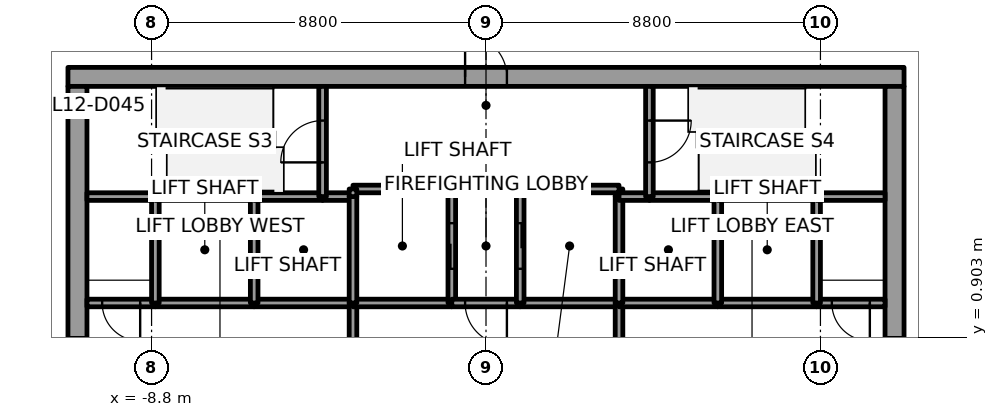
"""IFC4 building model, lengths in metres.
Left out: names, types, materials, properties, quantities, classifications, styles, units other than length and angle.
Written with IfcOpenShell. Run it as: python <this file> out.ifc"""

import sys

from ifc_helpers import new_model, si_unit, direction, frame, frame_2d, origin, place, context, subcontext, project, spatial, rectangle, extrude, element, fill, save


model = new_model("IFC4")
c1 = context("Model", 3, precision=1e-05, world=origin(), true_north=direction((0.0, 1.0)))
c2 = subcontext(c1, "Body", "Model", "MODEL_VIEW")
j1 = project(units=[si_unit("LENGTHUNIT", "METRE"), si_unit("PLANEANGLEUNIT", "RADIAN")], contexts=[c1])
p1 = place(None, origin())
s1 = spatial("IfcSite", under=j1, at=p1, CompositionType="ELEMENT")
p2 = place(p1, origin())
s2 = spatial("IfcBuilding", under=s1, at=p2, CompositionType="ELEMENT")
p3 = place(p2, frame((0.0, 0.0, 66.5)))
s3 = spatial("IfcBuildingStorey", under=s2, at=p3, CompositionType="ELEMENT", Elevation=66.5)
p4 = place(p3, frame((-11.0, 7.75, 0.0), z_axis=(0.0, 0.0, 1.0), x_axis=(1.0, 0.0, 0.0)))
e1 = element("IfcWall", 1, at=p4, inside=s3, PredefinedType="SHEAR", context=c2, shape_type="SweptSolid", body=[
    extrude(rectangle(XDim=22.0, YDim=0.5, at=frame_2d((11.0, 0.0))), origin(), (0.0, 0.0, 1.0), 3.7),
])
p5 = place(p4, frame((10.45, 0.0, 0.0)))
e2 = element("IfcOpeningElement", 2, at=p5, cuts=e1, PredefinedType="OPENING", context=c2, shape_type="SweptSolid", body=[
    extrude(rectangle(XDim=1.1, YDim=2.1, at=frame_2d((0.55, 1.05))), frame((0.0, 0.25, 0.0), z_axis=(0.0, -1.0, 0.0), x_axis=(1.0, 0.0, 0.0)), (0.0, 0.0, 1.0), 0.5),
])
p6 = place(p3, frame((-10.75, -7.5, 0.0), z_axis=(0.0, 0.0, 1.0), x_axis=(0.0, 1.0, 0.0)))
e3 = element("IfcWall", 3, at=p6, inside=s3, PredefinedType="SHEAR", context=c2, shape_type="SweptSolid", body=[
    extrude(rectangle(XDim=15.0, YDim=0.5, at=frame_2d((7.5, 0.0))), origin(), (0.0, 0.0, 1.0), 3.7),
])
p7 = place(p6, frame((6.6, 0.0, 0.0)))
e4 = element("IfcOpeningElement", 4, at=p7, cuts=e3, PredefinedType="OPENING", context=c2, shape_type="SweptSolid", body=[
    extrude(rectangle(XDim=1.8, YDim=2.1, at=frame_2d((0.9, 1.05))), frame((0.0, 0.25, 0.0), z_axis=(0.0, -1.0, 0.0), x_axis=(1.0, 0.0, 0.0)), (0.0, 0.0, 1.0), 0.5),
])
p8 = place(p3, frame((10.75, -7.5, 0.0), z_axis=(0.0, 0.0, 1.0), x_axis=(0.0, 1.0, 0.0)))
e5 = element("IfcWall", 5, at=p8, inside=s3, PredefinedType="SHEAR", context=c2, shape_type="SweptSolid", body=[
    extrude(rectangle(XDim=15.0, YDim=0.5, at=frame_2d((7.5, 0.0))), origin(), (0.0, 0.0, 1.0), 3.7),
])
p9 = place(p8, frame((6.6, 0.0, 0.0)))
e6 = element("IfcOpeningElement", 6, at=p9, cuts=e5, PredefinedType="OPENING", context=c2, shape_type="SweptSolid", body=[
    extrude(rectangle(XDim=1.8, YDim=2.1, at=frame_2d((0.9, 1.05))), frame((0.0, 0.25, 0.0), z_axis=(0.0, -1.0, 0.0), x_axis=(1.0, 0.0, 0.0)), (0.0, 0.0, 1.0), 0.5),
])
p10 = place(p3, frame((-8.7, 1.8, 0.0), z_axis=(0.0, 0.0, 1.0), x_axis=(-1.0, 0.0, 0.0)))
e7 = element("IfcWall", 7, at=p10, inside=s3, PredefinedType="SOLIDWALL", context=c2, shape_type="SweptSolid", body=[
    extrude(rectangle(XDim=1.8, YDim=0.2, at=frame_2d((0.9, 0.0))), origin(), (0.0, 0.0, 1.0), 3.55),
])
p11 = place(p10, frame((0.4, 0.0, 0.0)))
e8 = element("IfcOpeningElement", 8, at=p11, cuts=e7, PredefinedType="OPENING", context=c2, shape_type="SweptSolid", body=[
    extrude(rectangle(XDim=1.0, YDim=2.1, at=frame_2d((0.5, 1.05))), frame((0.0, 0.1, 0.0), z_axis=(0.0, -1.0, 0.0), x_axis=(1.0, 0.0, 0.0)), (0.0, 0.0, 1.0), 0.2),
])
p12 = place(p3, frame((-8.7, 4.6, 0.0), z_axis=(0.0, 0.0, 1.0), x_axis=(-1.0, 0.0, 0.0)))
e9 = element("IfcWall", 9, at=p12, inside=s3, PredefinedType="SOLIDWALL", context=c2, shape_type="SweptSolid", body=[
    extrude(rectangle(XDim=1.8, YDim=0.2, at=frame_2d((0.9, 0.0))), origin(), (0.0, 0.0, 1.0), 3.55),
])
p13 = place(p3, frame((-6.1, 1.8, 0.0), z_axis=(0.0, 0.0, 1.0), x_axis=(-1.0, 0.0, 0.0)))
e10 = element("IfcWall", 10, at=p13, inside=s3, PredefinedType="SOLIDWALL", context=c2, shape_type="SweptSolid", body=[
    extrude(rectangle(XDim=2.6, YDim=0.2, at=frame_2d((1.3, 0.0))), origin(), (0.0, 0.0, 1.0), 3.55),
])
p14 = place(p3, frame((-8.7, 1.8, 0.0), z_axis=(0.0, 0.0, 1.0), x_axis=(0.0, 1.0, 0.0)))
e11 = element("IfcWall", 11, at=p14, inside=s3, PredefinedType="SOLIDWALL", context=c2, shape_type="SweptSolid", body=[
    extrude(rectangle(XDim=2.8, YDim=0.2, at=frame_2d((1.4, 0.0))), origin(), (0.0, 0.0, 1.0), 3.55),
])
p15 = place(p3, frame((-6.1, 4.6, 0.0), z_axis=(0.0, 0.0, 1.0), x_axis=(-1.0, 0.0, 0.0)))
e12 = element("IfcWall", 12, at=p15, inside=s3, PredefinedType="SOLIDWALL", context=c2, shape_type="SweptSolid", body=[
    extrude(rectangle(XDim=2.6, YDim=0.2, at=frame_2d((1.3, 0.0))), origin(), (0.0, 0.0, 1.0), 3.55),
])
p16 = place(p3, frame((-3.5, 1.8, 0.0), z_axis=(0.0, 0.0, 1.0), x_axis=(-1.0, 0.0, 0.0)))
e13 = element("IfcWall", 13, at=p16, inside=s3, PredefinedType="SOLIDWALL", context=c2, shape_type="SweptSolid", body=[
    extrude(rectangle(XDim=2.6, YDim=0.2, at=frame_2d((1.3, 0.0))), origin(), (0.0, 0.0, 1.0), 3.55),
])
p17 = place(p3, frame((-6.1, 1.8, 0.0), z_axis=(0.0, 0.0, 1.0), x_axis=(0.0, 1.0, 0.0)))
e14 = element("IfcWall", 14, at=p17, inside=s3, PredefinedType="SOLIDWALL", context=c2, shape_type="SweptSolid", body=[
    extrude(rectangle(XDim=2.8, YDim=0.2, at=frame_2d((1.4, 0.0))), origin(), (0.0, 0.0, 1.0), 3.55),
])
p18 = place(p3, frame((-4.3, 4.6, 0.0), z_axis=(0.0, 0.0, 1.0), x_axis=(-1.0, 0.0, 0.0)))
e15 = element("IfcWall", 15, at=p18, inside=s3, PredefinedType="SOLIDWALL", context=c2, shape_type="SweptSolid", body=[
    extrude(rectangle(XDim=1.8, YDim=0.2, at=frame_2d((0.9, 0.0))), origin(), (0.0, 0.0, 1.0), 3.55),
])
p19 = place(p3, frame((-3.5, 4.6, 0.0), z_axis=(0.0, 0.0, 1.0), x_axis=(-1.0, 0.0, 0.0)))
e16 = element("IfcWall", 16, at=p19, inside=s3, PredefinedType="SOLIDWALL", context=c2, shape_type="SweptSolid", body=[
    extrude(rectangle(XDim=0.8, YDim=0.2, at=frame_2d((0.4, 0.0))), origin(), (0.0, 0.0, 1.0), 3.55),
])
p20 = place(p3, frame((-4.3, 4.6, 0.0), z_axis=(0.0, 0.0, 1.0), x_axis=(0.0, 1.0, 0.0)))
e17 = element("IfcWall", 17, at=p20, inside=s3, PredefinedType="SOLIDWALL", context=c2, shape_type="SweptSolid", body=[
    extrude(rectangle(XDim=2.9, YDim=0.2, at=frame_2d((1.45, 0.0))), origin(), (0.0, 0.0, 1.0), 3.55),
])
p21 = place(p20, frame((0.9, 0.0, 0.0)))
e18 = element("IfcOpeningElement", 18, at=p21, cuts=e17, PredefinedType="OPENING", context=c2, shape_type="SweptSolid", body=[
    extrude(rectangle(XDim=1.1, YDim=2.1, at=frame_2d((0.55, 1.05))), frame((0.0, 0.1, 0.0), z_axis=(0.0, -1.0, 0.0), x_axis=(1.0, 0.0, 0.0)), (0.0, 0.0, 1.0), 0.2),
])
p22 = place(p3, frame((-3.5, 1.8, 0.0), z_axis=(0.0, 0.0, 1.0), x_axis=(0.0, -1.0, 0.0)))
e19 = element("IfcWall", 19, at=p22, inside=s3, PredefinedType="SOLIDWALL", context=c2, shape_type="SweptSolid", body=[
    extrude(rectangle(XDim=3.6, YDim=0.2, at=frame_2d((1.8, 0.0))), origin(), (0.0, 0.0, 1.0), 3.55),
])
p23 = place(p22, frame((1.05, 0.0, 0.0)))
e20 = element("IfcOpeningElement", 20, at=p23, cuts=e19, PredefinedType="OPENING", context=c2, shape_type="SweptSolid", body=[
    extrude(rectangle(XDim=1.5, YDim=2.1, at=frame_2d((0.75, 1.05))), frame((0.0, 0.1, 0.0), z_axis=(0.0, -1.0, 0.0), x_axis=(1.0, 0.0, 0.0)), (0.0, 0.0, 1.0), 0.2),
])
p24 = place(p3, frame((-0.9, 1.8, 0.0), z_axis=(0.0, 0.0, 1.0), x_axis=(-1.0, 0.0, 0.0)))
e21 = element("IfcWall", 21, at=p24, inside=s3, PredefinedType="SOLIDWALL", context=c2, shape_type="SweptSolid", body=[
    extrude(rectangle(XDim=2.6, YDim=0.2, at=frame_2d((1.3, 0.0))), origin(), (0.0, 0.0, 1.0), 3.55),
])
p25 = place(p3, frame((-3.5, 4.6, 0.0), z_axis=(0.0, 0.0, 1.0), x_axis=(0.0, -1.0, 0.0)))
e22 = element("IfcWall", 22, at=p25, inside=s3, PredefinedType="SOLIDWALL", context=c2, shape_type="SweptSolid", body=[
    extrude(rectangle(XDim=2.8, YDim=0.2, at=frame_2d((1.4, 0.0))), origin(), (0.0, 0.0, 1.0), 3.55),
])
p26 = place(p3, frame((-0.9, 1.8, 0.0), z_axis=(0.0, 0.0, 1.0), x_axis=(0.0, 1.0, 0.0)))
e23 = element("IfcWall", 23, at=p26, inside=s3, PredefinedType="SOLIDWALL", context=c2, shape_type="SweptSolid", body=[
    extrude(rectangle(XDim=3.0, YDim=0.2, at=frame_2d((1.5, 0.0))), origin(), (0.0, 0.0, 1.0), 3.55),
])
p27 = place(p26, frame((0.9, 0.0, 0.0)))
e24 = element("IfcOpeningElement", 24, at=p27, cuts=e23, PredefinedType="OPENING", context=c2, shape_type="SweptSolid", body=[
    extrude(rectangle(XDim=1.2, YDim=2.1, at=frame_2d((0.6, 1.05))), frame((0.0, 0.1, 0.0), z_axis=(0.0, -1.0, 0.0), x_axis=(1.0, 0.0, 0.0)), (0.0, 0.0, 1.0), 0.2),
])
p28 = place(p3, frame((-0.9, 4.8, 0.0), z_axis=(0.0, 0.0, 1.0), x_axis=(-1.0, 0.0, 0.0)))
e25 = element("IfcWall", 25, at=p28, inside=s3, PredefinedType="SOLIDWALL", context=c2, shape_type="SweptSolid", body=[
    extrude(rectangle(XDim=2.6, YDim=0.2, at=frame_2d((1.3, 0.0))), origin(), (0.0, 0.0, 1.0), 3.55),
])
p29 = place(p3, frame((-3.5, 4.8, 0.0), z_axis=(0.0, 0.0, 1.0), x_axis=(0.0, -1.0, 0.0)))
e26 = element("IfcWall", 26, at=p29, inside=s3, PredefinedType="SOLIDWALL", context=c2, shape_type="SweptSolid", body=[
    extrude(rectangle(XDim=0.2, YDim=0.2, at=frame_2d((0.1, 0.0))), origin(), (0.0, 0.0, 1.0), 3.55),
])
p30 = place(p3, frame((0.9, 1.8, 0.0), z_axis=(0.0, 0.0, 1.0), x_axis=(-1.0, 0.0, 0.0)))
e27 = element("IfcWall", 27, at=p30, inside=s3, PredefinedType="SOLIDWALL", context=c2, shape_type="SweptSolid", body=[
    extrude(rectangle(XDim=1.8, YDim=0.2, at=frame_2d((0.9, 0.0))), origin(), (0.0, 0.0, 1.0), 3.55),
])
p31 = place(p30, frame((0.35, 0.0, 0.0)))
e28 = element("IfcOpeningElement", 28, at=p31, cuts=e27, PredefinedType="OPENING", context=c2, shape_type="SweptSolid", body=[
    extrude(rectangle(XDim=1.1, YDim=2.1, at=frame_2d((0.55, 1.05))), frame((0.0, 0.1, 0.0), z_axis=(0.0, -1.0, 0.0), x_axis=(1.0, 0.0, 0.0)), (0.0, 0.0, 1.0), 0.2),
])
p32 = place(p3, frame((3.5, 1.8, 0.0), z_axis=(0.0, 0.0, 1.0), x_axis=(-1.0, 0.0, 0.0)))
e29 = element("IfcWall", 29, at=p32, inside=s3, PredefinedType="SOLIDWALL", context=c2, shape_type="SweptSolid", body=[
    extrude(rectangle(XDim=2.6, YDim=0.2, at=frame_2d((1.3, 0.0))), origin(), (0.0, 0.0, 1.0), 3.55),
])
p33 = place(p3, frame((3.5, 4.6, 0.0), z_axis=(0.0, 0.0, 1.0), x_axis=(0.0, 1.0, 0.0)))
e30 = element("IfcWall", 30, at=p33, inside=s3, PredefinedType="SOLIDWALL", context=c2, shape_type="SweptSolid", body=[
    extrude(rectangle(XDim=0.2, YDim=0.2, at=frame_2d((0.1, 0.0))), origin(), (0.0, 0.0, 1.0), 3.55),
])
p34 = place(p3, frame((3.5, 4.8, 0.0), z_axis=(0.0, 0.0, 1.0), x_axis=(-1.0, 0.0, 0.0)))
e31 = element("IfcWall", 31, at=p34, inside=s3, PredefinedType="SOLIDWALL", context=c2, shape_type="SweptSolid", body=[
    extrude(rectangle(XDim=2.6, YDim=0.2, at=frame_2d((1.3, 0.0))), origin(), (0.0, 0.0, 1.0), 3.55),
])
p35 = place(p3, frame((0.9, 4.8, 0.0), z_axis=(0.0, 0.0, 1.0), x_axis=(0.0, -1.0, 0.0)))
e32 = element("IfcWall", 32, at=p35, inside=s3, PredefinedType="SOLIDWALL", context=c2, shape_type="SweptSolid", body=[
    extrude(rectangle(XDim=3.0, YDim=0.2, at=frame_2d((1.5, 0.0))), origin(), (0.0, 0.0, 1.0), 3.55),
])
p36 = place(p35, frame((0.9, 0.0, 0.0)))
e33 = element("IfcOpeningElement", 33, at=p36, cuts=e32, PredefinedType="OPENING", context=c2, shape_type="SweptSolid", body=[
    extrude(rectangle(XDim=1.2, YDim=2.1, at=frame_2d((0.6, 1.05))), frame((0.0, 0.1, 0.0), z_axis=(0.0, -1.0, 0.0), x_axis=(1.0, 0.0, 0.0)), (0.0, 0.0, 1.0), 0.2),
])
p37 = place(p3, frame((3.5, -1.8, 0.0), z_axis=(0.0, 0.0, 1.0), x_axis=(0.0, 1.0, 0.0)))
e34 = element("IfcWall", 34, at=p37, inside=s3, PredefinedType="SOLIDWALL", context=c2, shape_type="SweptSolid", body=[
    extrude(rectangle(XDim=3.6, YDim=0.2, at=frame_2d((1.8, 0.0))), origin(), (0.0, 0.0, 1.0), 3.55),
])
p38 = place(p37, frame((1.05, 0.0, 0.0)))
e35 = element("IfcOpeningElement", 35, at=p38, cuts=e34, PredefinedType="OPENING", context=c2, shape_type="SweptSolid", body=[
    extrude(rectangle(XDim=1.5, YDim=2.1, at=frame_2d((0.75, 1.05))), frame((0.0, 0.1, 0.0), z_axis=(0.0, -1.0, 0.0), x_axis=(1.0, 0.0, 0.0)), (0.0, 0.0, 1.0), 0.2),
])
p39 = place(p3, frame((6.1, 1.8, 0.0), z_axis=(0.0, 0.0, 1.0), x_axis=(-1.0, 0.0, 0.0)))
e36 = element("IfcWall", 36, at=p39, inside=s3, PredefinedType="SOLIDWALL", context=c2, shape_type="SweptSolid", body=[
    extrude(rectangle(XDim=2.6, YDim=0.2, at=frame_2d((1.3, 0.0))), origin(), (0.0, 0.0, 1.0), 3.55),
])
p40 = place(p3, frame((3.5, 1.8, 0.0), z_axis=(0.0, 0.0, 1.0), x_axis=(0.0, 1.0, 0.0)))
e37 = element("IfcWall", 37, at=p40, inside=s3, PredefinedType="SOLIDWALL", context=c2, shape_type="SweptSolid", body=[
    extrude(rectangle(XDim=2.8, YDim=0.2, at=frame_2d((1.4, 0.0))), origin(), (0.0, 0.0, 1.0), 3.55),
])
p41 = place(p3, frame((4.3, 4.6, 0.0), z_axis=(0.0, 0.0, 1.0), x_axis=(-1.0, 0.0, 0.0)))
e38 = element("IfcWall", 38, at=p41, inside=s3, PredefinedType="SOLIDWALL", context=c2, shape_type="SweptSolid", body=[
    extrude(rectangle(XDim=0.8, YDim=0.2, at=frame_2d((0.4, 0.0))), origin(), (0.0, 0.0, 1.0), 3.55),
])
p42 = place(p3, frame((6.1, 4.6, 0.0), z_axis=(0.0, 0.0, 1.0), x_axis=(-1.0, 0.0, 0.0)))
e39 = element("IfcWall", 39, at=p42, inside=s3, PredefinedType="SOLIDWALL", context=c2, shape_type="SweptSolid", body=[
    extrude(rectangle(XDim=1.8, YDim=0.2, at=frame_2d((0.9, 0.0))), origin(), (0.0, 0.0, 1.0), 3.55),
])
p43 = place(p3, frame((4.3, 7.5, 0.0), z_axis=(0.0, 0.0, 1.0), x_axis=(0.0, -1.0, 0.0)))
e40 = element("IfcWall", 40, at=p43, inside=s3, PredefinedType="SOLIDWALL", context=c2, shape_type="SweptSolid", body=[
    extrude(rectangle(XDim=2.9, YDim=0.2, at=frame_2d((1.45, 0.0))), origin(), (0.0, 0.0, 1.0), 3.55),
])
p44 = place(p43, frame((0.9, 0.0, 0.0)))
e41 = element("IfcOpeningElement", 41, at=p44, cuts=e40, PredefinedType="OPENING", context=c2, shape_type="SweptSolid", body=[
    extrude(rectangle(XDim=1.1, YDim=2.1, at=frame_2d((0.55, 1.05))), frame((0.0, 0.1, 0.0), z_axis=(0.0, -1.0, 0.0), x_axis=(1.0, 0.0, 0.0)), (0.0, 0.0, 1.0), 0.2),
])
p45 = place(p3, frame((8.7, 1.8, 0.0), z_axis=(0.0, 0.0, 1.0), x_axis=(-1.0, 0.0, 0.0)))
e42 = element("IfcWall", 42, at=p45, inside=s3, PredefinedType="SOLIDWALL", context=c2, shape_type="SweptSolid", body=[
    extrude(rectangle(XDim=2.6, YDim=0.2, at=frame_2d((1.3, 0.0))), origin(), (0.0, 0.0, 1.0), 3.55),
])
p46 = place(p3, frame((6.1, 1.8, 0.0), z_axis=(0.0, 0.0, 1.0), x_axis=(0.0, 1.0, 0.0)))
e43 = element("IfcWall", 43, at=p46, inside=s3, PredefinedType="SOLIDWALL", context=c2, shape_type="SweptSolid", body=[
    extrude(rectangle(XDim=2.8, YDim=0.2, at=frame_2d((1.4, 0.0))), origin(), (0.0, 0.0, 1.0), 3.55),
])
p47 = place(p3, frame((8.7, 4.6, 0.0), z_axis=(0.0, 0.0, 1.0), x_axis=(-1.0, 0.0, 0.0)))
e44 = element("IfcWall", 44, at=p47, inside=s3, PredefinedType="SOLIDWALL", context=c2, shape_type="SweptSolid", body=[
    extrude(rectangle(XDim=2.6, YDim=0.2, at=frame_2d((1.3, 0.0))), origin(), (0.0, 0.0, 1.0), 3.55),
])
p48 = place(p3, frame((10.5, 1.8, 0.0), z_axis=(0.0, 0.0, 1.0), x_axis=(-1.0, 0.0, 0.0)))
e45 = element("IfcWall", 45, at=p48, inside=s3, PredefinedType="SOLIDWALL", context=c2, shape_type="SweptSolid", body=[
    extrude(rectangle(XDim=1.8, YDim=0.2, at=frame_2d((0.9, 0.0))), origin(), (0.0, 0.0, 1.0), 3.55),
])
p49 = place(p48, frame((0.4, 0.0, 0.0)))
e46 = element("IfcOpeningElement", 46, at=p49, cuts=e45, PredefinedType="OPENING", context=c2, shape_type="SweptSolid", body=[
    extrude(rectangle(XDim=1.0, YDim=2.1, at=frame_2d((0.5, 1.05))), frame((0.0, 0.1, 0.0), z_axis=(0.0, -1.0, 0.0), x_axis=(1.0, 0.0, 0.0)), (0.0, 0.0, 1.0), 0.2),
])
p50 = place(p3, frame((8.7, 4.6, 0.0), z_axis=(0.0, 0.0, 1.0), x_axis=(0.0, -1.0, 0.0)))
e47 = element("IfcWall", 47, at=p50, inside=s3, PredefinedType="SOLIDWALL", context=c2, shape_type="SweptSolid", body=[
    extrude(rectangle(XDim=2.8, YDim=0.2, at=frame_2d((1.4, 0.0))), origin(), (0.0, 0.0, 1.0), 3.55),
])
p51 = place(p3, frame((10.5, 4.6, 0.0), z_axis=(0.0, 0.0, 1.0), x_axis=(-1.0, 0.0, 0.0)))
e48 = element("IfcWall", 48, at=p51, inside=s3, PredefinedType="SOLIDWALL", context=c2, shape_type="SweptSolid", body=[
    extrude(rectangle(XDim=1.8, YDim=0.2, at=frame_2d((0.9, 0.0))), origin(), (0.0, 0.0, 1.0), 3.55),
])
p52 = place(p27, origin())
e49 = element("IfcDoor", 49, at=p52, inside=s3, OperationType="SLIDING_TO_LEFT", PredefinedType="DOOR", context=c2, shape_type="SweptSolid", body=[
    extrude(rectangle(XDim=1.2, YDim=2.1, at=frame_2d((0.6, 1.05))), frame((0.0, 0.025, 0.0), z_axis=(0.0, -1.0, 0.0), x_axis=(1.0, 0.0, 0.0)), (0.0, 0.0, 1.0), 0.05),
])
fill(e24, e49)
p53 = place(p36, origin())
e50 = element("IfcDoor", 50, at=p53, inside=s3, OperationType="SLIDING_TO_RIGHT", PredefinedType="DOOR", context=c2, shape_type="SweptSolid", body=[
    extrude(rectangle(XDim=1.2, YDim=2.1, at=frame_2d((0.6, 1.05))), frame((0.0, 0.025, 0.0), z_axis=(0.0, -1.0, 0.0), x_axis=(1.0, 0.0, 0.0)), (0.0, 0.0, 1.0), 0.05),
])
fill(e33, e50)
p54 = place(p31, origin())
e51 = element("IfcDoor", 51, at=p54, inside=s3, OperationType="SINGLE_SWING_LEFT", PredefinedType="DOOR", context=c2, shape_type="SweptSolid", body=[
    extrude(rectangle(XDim=1.1, YDim=2.1, at=frame_2d((0.55, 1.05))), frame((0.0, 0.025, 0.0), z_axis=(0.0, -1.0, 0.0), x_axis=(1.0, 0.0, 0.0)), (0.0, 0.0, 1.0), 0.05),
])
fill(e28, e51)
p55 = place(p11, origin())
e52 = element("IfcDoor", 52, at=p55, inside=s3, OperationType="SINGLE_SWING_RIGHT", PredefinedType="DOOR", context=c2, shape_type="SweptSolid", body=[
    extrude(rectangle(XDim=1.0, YDim=2.1, at=frame_2d((0.5, 1.05))), frame((0.0, 0.025, 0.0), z_axis=(0.0, -1.0, 0.0), x_axis=(1.0, 0.0, 0.0)), (0.0, 0.0, 1.0), 0.05),
])
fill(e8, e52)
p56 = place(p49, origin())
e53 = element("IfcDoor", 53, at=p56, inside=s3, OperationType="SINGLE_SWING_RIGHT", PredefinedType="DOOR", context=c2, shape_type="SweptSolid", body=[
    extrude(rectangle(XDim=1.0, YDim=2.1, at=frame_2d((0.5, 1.05))), frame((0.0, 0.025, 0.0), z_axis=(0.0, -1.0, 0.0), x_axis=(1.0, 0.0, 0.0)), (0.0, 0.0, 1.0), 0.05),
])
fill(e46, e53)
p57 = place(p21, origin())
e54 = element("IfcDoor", 54, at=p57, inside=s3, OperationType="SINGLE_SWING_LEFT", PredefinedType="DOOR", context=c2, shape_type="SweptSolid", body=[
    extrude(rectangle(XDim=1.1, YDim=2.1, at=frame_2d((0.55, 1.05))), frame((0.0, 0.025, 0.0), z_axis=(0.0, -1.0, 0.0), x_axis=(1.0, 0.0, 0.0)), (0.0, 0.0, 1.0), 0.05),
])
fill(e18, e54)
p58 = place(p44, origin())
e55 = element("IfcDoor", 55, at=p58, inside=s3, OperationType="SINGLE_SWING_RIGHT", PredefinedType="DOOR", context=c2, shape_type="SweptSolid", body=[
    extrude(rectangle(XDim=1.1, YDim=2.1, at=frame_2d((0.55, 1.05))), frame((0.0, 0.025, 0.0), z_axis=(0.0, -1.0, 0.0), x_axis=(1.0, 0.0, 0.0)), (0.0, 0.0, 1.0), 0.05),
])
fill(e41, e55)
p59 = place(p7, origin())
e56 = element("IfcDoor", 56, at=p59, inside=s3, OperationType="DOUBLE_DOOR_SINGLE_SWING", PredefinedType="DOOR", context=c2, shape_type="SweptSolid", body=[
    extrude(rectangle(XDim=1.8, YDim=2.1, at=frame_2d((0.9, 1.05))), frame((0.0, 0.025, 0.0), z_axis=(0.0, -1.0, 0.0), x_axis=(1.0, 0.0, 0.0)), (0.0, 0.0, 1.0), 0.05),
])
fill(e4, e56)
p60 = place(p9, origin())
e57 = element("IfcDoor", 57, at=p60, inside=s3, OperationType="DOUBLE_DOOR_SINGLE_SWING", PredefinedType="DOOR", context=c2, shape_type="SweptSolid", body=[
    extrude(rectangle(XDim=1.8, YDim=2.1, at=frame_2d((0.9, 1.05))), frame((0.0, 0.025, 0.0), z_axis=(0.0, -1.0, 0.0), x_axis=(1.0, 0.0, 0.0)), (0.0, 0.0, 1.0), 0.05),
])
fill(e6, e57)
p61 = place(p5, origin())
e58 = element("IfcDoor", 58, at=p61, inside=s3, OperationType="SINGLE_SWING_LEFT", PredefinedType="DOOR", context=c2, shape_type="SweptSolid", body=[
    extrude(rectangle(XDim=1.1, YDim=2.1, at=frame_2d((0.55, 1.05))), frame((0.0, 0.025, 0.0), z_axis=(0.0, -1.0, 0.0), x_axis=(1.0, 0.0, 0.0)), (0.0, 0.0, 1.0), 0.05),
])
fill(e2, e58)
save(model, sys.argv[1])
